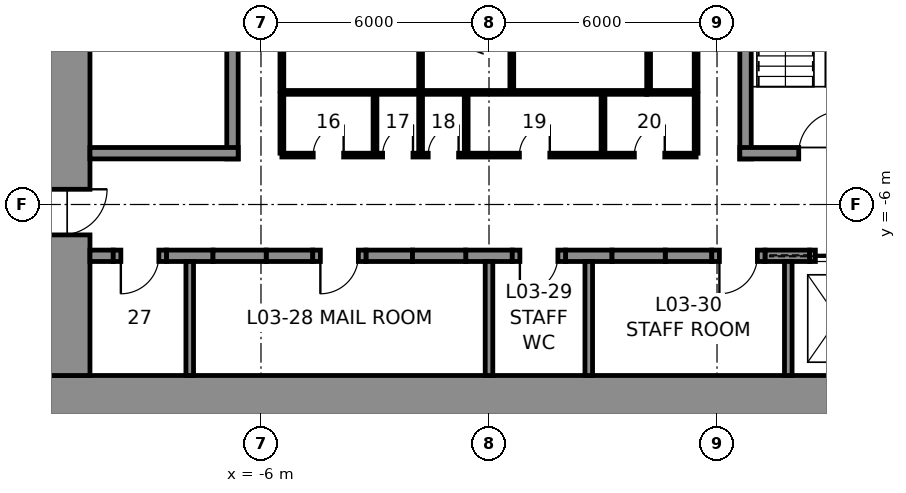
"""IFC4 building model, lengths in metres.
Left out: names, types, materials, properties, quantities, classifications, styles, units other than length and angle.
Written with IfcOpenShell. Run it as: python <this file> out.ifc"""

import sys

from ifc_helpers import new_model, si_unit, direction, frame, frame_2d, origin, place, context, subcontext, project, spatial, rectangle, extrude, element, fill, save


model = new_model("IFC4")
c1 = context("Model", 3, precision=1e-05, world=origin(), true_north=direction((0.0, 1.0)))
c2 = subcontext(c1, "Body", "Model", "MODEL_VIEW")
j1 = project(units=[si_unit("LENGTHUNIT", "METRE"), si_unit("PLANEANGLEUNIT", "RADIAN")], contexts=[c1])
p1 = place(None, origin())
s1 = spatial("IfcSite", under=j1, at=p1, CompositionType="ELEMENT")
p2 = place(p1, origin())
s2 = spatial("IfcBuilding", under=s1, at=p2, CompositionType="ELEMENT")
p3 = place(p2, frame((0.0, 0.0, 16.0)))
s3 = spatial("IfcBuildingStorey", under=s2, at=p3, CompositionType="ELEMENT", Elevation=16.0)
p4 = place(p3, frame((12.0, -11.25, 0.0), z_axis=(0.0, 0.0, 1.0), x_axis=(-1.0, 0.0, 0.0)))
e1 = element("IfcWall", 1, at=p4, inside=s3, PredefinedType="SHEAR", context=c2, shape_type="SweptSolid", body=[
    extrude(rectangle(XDim=24.0, YDim=1.5, at=frame_2d((12.0, 0.0))), origin(), (0.0, 0.0, 1.0), 5.0),
])
p5 = place(p3, frame((-11.25, -10.5, 0.0), z_axis=(0.0, 0.0, 1.0), x_axis=(0.0, 1.0, 0.0)))
e2 = element("IfcWall", 2, at=p5, inside=s3, PredefinedType="SHEAR", context=c2, shape_type="SweptSolid", body=[
    extrude(rectangle(XDim=21.0, YDim=1.5, at=frame_2d((10.5, 0.0))), origin(), (0.0, 0.0, 1.0), 5.0),
])
p6 = place(p5, frame((16.1, 0.0, 0.0)))
e3 = element("IfcOpeningElement", 3, at=p6, cuts=e2, PredefinedType="OPENING", context=c2, shape_type="SweptSolid", body=[
    extrude(rectangle(XDim=1.2, YDim=2.3, at=frame_2d((0.6, 1.15))), frame((0.0, 0.76, 0.0), z_axis=(0.0, -1.0, 0.0), x_axis=(1.0, 0.0, 0.0)), (0.0, 0.0, 1.0), 1.52),
])
p7 = place(p5, frame((3.7, 0.0, 0.0)))
e4 = element("IfcOpeningElement", 4, at=p7, cuts=e2, PredefinedType="OPENING", context=c2, shape_type="SweptSolid", body=[
    extrude(rectangle(XDim=1.2, YDim=2.3, at=frame_2d((0.6, 1.15))), frame((0.0, 0.76, 0.0), z_axis=(0.0, -1.0, 0.0), x_axis=(1.0, 0.0, 0.0)), (0.0, 0.0, 1.0), 1.52),
])
p8 = place(p3, frame((-10.5, -7.35, 0.0), z_axis=(0.0, 0.0, 1.0), x_axis=(1.0, 0.0, 0.0)))
e5 = element("IfcWall", 5, at=p8, inside=s3, PredefinedType="SHEAR", context=c2, shape_type="SweptSolid", body=[
    extrude(rectangle(XDim=0.613, YDim=0.3, at=frame_2d((0.306, 0.0))), origin(), (0.0, 0.0, 1.0), 5.0),
])
for number, where, z_axis, x_axis in (
    (6, (-8.488, -7.35, 0.0), (0.0, 0.0, 1.0), (1.0, 0.0, 0.0)),
    (7, (-5.863, -7.35, 0.0), (0.0, 0.0, 1.0), (1.0, 0.0, 0.0)),
    (8, (-3.238, -7.35, 0.0), (0.0, 0.0, 1.0), (1.0, 0.0, 0.0)),
    (9, (-0.613, -7.35, 0.0), (0.0, 0.0, 1.0), (1.0, 0.0, 0.0)),
    (10, (2.012, -7.35, 0.0), (0.0, 0.0, 1.0), (1.0, 0.0, 0.0)),
    (11, (4.637, -7.35, 0.0), (0.0, 0.0, 1.0), (1.0, 0.0, 0.0)),
):
    element("IfcWall", number, at=place(p3, frame(where, z_axis=z_axis, x_axis=x_axis)), inside=s3, PredefinedType="SHEAR", context=c2, shape_type="SweptSolid", body=[
        extrude(rectangle(XDim=1.225, YDim=0.3, at=frame_2d((0.613, 0.0))), origin(), (0.0, 0.0, 1.0), 5.0),
    ])
p9 = place(p3, frame((7.262, -7.35, 0.0), z_axis=(0.0, 0.0, 1.0), x_axis=(1.0, 0.0, 0.0)))
e12 = element("IfcWall", 12, at=p9, inside=s3, PredefinedType="SHEAR", context=c2, shape_type="SweptSolid", body=[
    extrude(rectangle(XDim=1.175, YDim=0.3, at=frame_2d((0.587, 0.0))), origin(), (0.0, 0.0, 1.0), 5.0),
])
p10 = place(p3, frame((-9.887, -7.35, 0.0), z_axis=(0.0, 0.0, 1.0), x_axis=(1.0, 0.0, 0.0)))
e13 = element("IfcWall", 13, at=p10, inside=s3, PredefinedType="PARTITIONING", context=c2, shape_type="SweptSolid", body=[
    extrude(rectangle(XDim=1.4, YDim=0.3, at=frame_2d((0.7, 0.0))), origin(), (0.0, 0.0, 1.0), 5.0),
])
p11 = place(p10, frame((0.2, 0.0, 0.0)))
e14 = element("IfcOpeningElement", 14, at=p11, cuts=e13, PredefinedType="OPENING", context=c2, shape_type="SweptSolid", body=[
    extrude(rectangle(XDim=1.0, YDim=2.3, at=frame_2d((0.5, 1.15))), frame((0.0, 0.16, 0.0), z_axis=(0.0, -1.0, 0.0), x_axis=(1.0, 0.0, 0.0)), (0.0, 0.0, 1.0), 0.32),
])
p12 = place(p3, frame((-7.262, -7.35, 0.0), z_axis=(0.0, 0.0, 1.0), x_axis=(1.0, 0.0, 0.0)))
e15 = element("IfcWall", 15, at=p12, inside=s3, PredefinedType="PARTITIONING", context=c2, shape_type="SweptSolid", body=[
    extrude(rectangle(XDim=1.4, YDim=0.3, at=frame_2d((0.7, 0.0))), origin(), (0.0, 0.0, 1.0), 5.0),
])
p13 = place(p3, frame((-4.637, -7.35, 0.0), z_axis=(0.0, 0.0, 1.0), x_axis=(1.0, 0.0, 0.0)))
e16 = element("IfcWall", 16, at=p13, inside=s3, PredefinedType="PARTITIONING", context=c2, shape_type="SweptSolid", body=[
    extrude(rectangle(XDim=1.4, YDim=0.3, at=frame_2d((0.7, 0.0))), origin(), (0.0, 0.0, 1.0), 5.0),
])
p14 = place(p13, frame((0.2, 0.0, 0.0)))
e17 = element("IfcOpeningElement", 17, at=p14, cuts=e16, PredefinedType="OPENING", context=c2, shape_type="SweptSolid", body=[
    extrude(rectangle(XDim=1.0, YDim=2.3, at=frame_2d((0.5, 1.15))), frame((0.0, 0.16, 0.0), z_axis=(0.0, -1.0, 0.0), x_axis=(1.0, 0.0, 0.0)), (0.0, 0.0, 1.0), 0.32),
])
p15 = place(p3, frame((-2.012, -7.35, 0.0), z_axis=(0.0, 0.0, 1.0), x_axis=(1.0, 0.0, 0.0)))
e18 = element("IfcWall", 18, at=p15, inside=s3, PredefinedType="PARTITIONING", context=c2, shape_type="SweptSolid", body=[
    extrude(rectangle(XDim=1.4, YDim=0.3, at=frame_2d((0.7, 0.0))), origin(), (0.0, 0.0, 1.0), 5.0),
])
p16 = place(p3, frame((0.613, -7.35, 0.0), z_axis=(0.0, 0.0, 1.0), x_axis=(1.0, 0.0, 0.0)))
e19 = element("IfcWall", 19, at=p16, inside=s3, PredefinedType="PARTITIONING", context=c2, shape_type="SweptSolid", body=[
    extrude(rectangle(XDim=1.4, YDim=0.3, at=frame_2d((0.7, 0.0))), origin(), (0.0, 0.0, 1.0), 5.0),
])
p17 = place(p16, frame((0.2, 0.0, 0.0)))
e20 = element("IfcOpeningElement", 20, at=p17, cuts=e19, PredefinedType="OPENING", context=c2, shape_type="SweptSolid", body=[
    extrude(rectangle(XDim=1.0, YDim=2.3, at=frame_2d((0.5, 1.15))), frame((0.0, 0.16, 0.0), z_axis=(0.0, -1.0, 0.0), x_axis=(1.0, 0.0, 0.0)), (0.0, 0.0, 1.0), 0.32),
])
p18 = place(p3, frame((3.238, -7.35, 0.0), z_axis=(0.0, 0.0, 1.0), x_axis=(1.0, 0.0, 0.0)))
e21 = element("IfcWall", 21, at=p18, inside=s3, PredefinedType="PARTITIONING", context=c2, shape_type="SweptSolid", body=[
    extrude(rectangle(XDim=1.4, YDim=0.3, at=frame_2d((0.7, 0.0))), origin(), (0.0, 0.0, 1.0), 5.0),
])
p19 = place(p3, frame((5.863, -7.35, 0.0), z_axis=(0.0, 0.0, 1.0), x_axis=(1.0, 0.0, 0.0)))
e22 = element("IfcWall", 22, at=p19, inside=s3, PredefinedType="PARTITIONING", context=c2, shape_type="SweptSolid", body=[
    extrude(rectangle(XDim=1.4, YDim=0.3, at=frame_2d((0.7, 0.0))), origin(), (0.0, 0.0, 1.0), 5.0),
])
p20 = place(p19, frame((0.2, 0.0, 0.0)))
e23 = element("IfcOpeningElement", 23, at=p20, cuts=e22, PredefinedType="OPENING", context=c2, shape_type="SweptSolid", body=[
    extrude(rectangle(XDim=1.0, YDim=2.3, at=frame_2d((0.5, 1.15))), frame((0.0, 0.16, 0.0), z_axis=(0.0, -1.0, 0.0), x_axis=(1.0, 0.0, 0.0)), (0.0, 0.0, 1.0), 0.32),
])
p21 = place(p3, frame((8.438, -7.35, 0.0), z_axis=(0.0, 0.0, 1.0), x_axis=(1.0, 0.0, 0.0)))
e24 = element("IfcWall", 24, at=p21, inside=s3, PredefinedType="PARTITIONING", context=c2, shape_type="SweptSolid", body=[
    extrude(rectangle(XDim=1.5, YDim=0.3, at=frame_2d((0.75, 0.0))), origin(), (0.0, 0.0, 1.0), 5.0),
])
p22 = place(p21, frame((0.15, 0.0, 0.0)))
e25 = element("IfcOpeningElement", 25, at=p22, cuts=e24, PredefinedType="OPENING", context=c2, shape_type="SweptSolid", body=[
    extrude(rectangle(XDim=1.2, YDim=2.3, at=frame_2d((0.6, 1.15))), frame((0.0, 0.16, 0.0), z_axis=(0.0, -1.0, 0.0), x_axis=(1.0, 0.0, 0.0)), (0.0, 0.0, 1.0), 0.32),
])
for number, where, z_axis, x_axis in (
    (26, (-7.875, -10.5, 0.0), (0.0, 0.0, 1.0), (0.0, 1.0, 0.0)),
    (27, (0.0, -10.5, 0.0), (0.0, 0.0, 1.0), (0.0, 1.0, 0.0)),
    (28, (2.625, -10.5, 0.0), (0.0, 0.0, 1.0), (0.0, 1.0, 0.0)),
    (29, (7.875, -10.5, 0.0), (0.0, 0.0, 1.0), (0.0, 1.0, 0.0)),
):
    element("IfcWall", number, at=place(p3, frame(where, z_axis=z_axis, x_axis=x_axis)), inside=s3, PredefinedType="PARTITIONING", context=c2, shape_type="SweptSolid", body=[
        extrude(rectangle(XDim=3.0, YDim=0.2, at=frame_2d((1.5, 0.0))), origin(), (0.0, 0.0, 1.0), 5.0),
    ])
p23 = place(p3, frame((-6.75, -4.8, 0.0), z_axis=(0.0, 0.0, 1.0), x_axis=(0.0, 1.0, 0.0)))
e30 = element("IfcWall", 30, at=p23, inside=s3, PredefinedType="SOLIDWALL", context=c2, shape_type="SweptSolid", body=[
    extrude(rectangle(XDim=9.6, YDim=0.3, at=frame_2d((4.8, 0.0))), origin(), (0.0, 0.0, 1.0), 4.75),
])
p24 = place(p3, frame((-6.6, -4.65, 0.0), z_axis=(0.0, 0.0, 1.0), x_axis=(-1.0, 0.0, 0.0)))
e31 = element("IfcWall", 31, at=p24, inside=s3, PredefinedType="SOLIDWALL", context=c2, shape_type="SweptSolid", body=[
    extrude(rectangle(XDim=3.9, YDim=0.3, at=frame_2d((1.95, 0.0))), origin(), (0.0, 0.0, 1.0), 4.75),
])
p25 = place(p3, frame((6.75, -4.8, 0.0), z_axis=(0.0, 0.0, 1.0), x_axis=(0.0, 1.0, 0.0)))
e32 = element("IfcWall", 32, at=p25, inside=s3, PredefinedType="SOLIDWALL", context=c2, shape_type="SweptSolid", body=[
    extrude(rectangle(XDim=9.6, YDim=0.3, at=frame_2d((4.8, 0.0))), origin(), (0.0, 0.0, 1.0), 4.75),
])
p26 = place(p3, frame((10.5, -4.65, 0.0), z_axis=(0.0, 0.0, 1.0), x_axis=(-1.0, 0.0, 0.0)))
e33 = element("IfcWall", 33, at=p26, inside=s3, PredefinedType="SOLIDWALL", context=c2, shape_type="SweptSolid", body=[
    extrude(rectangle(XDim=3.9, YDim=0.3, at=frame_2d((1.95, 0.0))), origin(), (0.0, 0.0, 1.0), 4.75),
])
p27 = place(p26, frame((1.25, 0.0, 0.0)))
e34 = element("IfcOpeningElement", 34, at=p27, cuts=e33, PredefinedType="OPENING", context=c2, shape_type="SweptSolid", body=[
    extrude(rectangle(XDim=1.1, YDim=2.3, at=frame_2d((0.55, 1.15))), frame((0.0, 0.16, 0.0), z_axis=(0.0, -1.0, 0.0), x_axis=(1.0, 0.0, 0.0)), (0.0, 0.0, 1.0), 0.32),
])
p28 = place(p3, frame((4.15, -3.05, 0.0), z_axis=(0.0, 0.0, 1.0), x_axis=(-1.0, 0.0, 0.0)))
e35 = element("IfcWall", 35, at=p28, inside=s3, PredefinedType="PARTITIONING", context=c2, shape_type="SweptSolid", body=[
    extrude(rectangle(XDim=9.6, YDim=0.1, at=frame_2d((4.8, 0.0))), origin(), (0.0, 0.0, 1.0), 4.75),
])
p29 = place(p3, frame((5.45, -3.05, 0.0), z_axis=(0.0, 0.0, 1.0), x_axis=(-1.0, 0.0, 0.0)))
e36 = element("IfcWall", 36, at=p29, inside=s3, PredefinedType="PARTITIONING", context=c2, shape_type="SweptSolid", body=[
    extrude(rectangle(XDim=1.3, YDim=0.1, at=frame_2d((0.65, 0.0))), origin(), (0.0, 0.0, 1.0), 4.75),
])
for number, where, z_axis, x_axis in (
    (37, (5.45, 3.0, 0.0), (0.0, 0.0, 1.0), (0.0, -1.0, 0.0)),
    (38, (-5.45, -3.0, 0.0), (0.0, 0.0, 1.0), (0.0, 1.0, 0.0)),
    (39, (-1.8, -3.0, 0.0), (0.0, 0.0, 1.0), (0.0, 1.0, 0.0)),
    (40, (0.6, -3.0, 0.0), (0.0, 0.0, 1.0), (0.0, 1.0, 0.0)),
    (41, (4.2, -3.0, 0.0), (0.0, 0.0, 1.0), (0.0, 1.0, 0.0)),
):
    element("IfcWall", number, at=place(p3, frame(where, z_axis=z_axis, x_axis=x_axis)), inside=s3, PredefinedType="PARTITIONING", context=c2, shape_type="SweptSolid", body=[
        extrude(rectangle(XDim=6.0, YDim=0.1, at=frame_2d((3.0, 0.0))), origin(), (0.0, 0.0, 1.0), 4.75),
    ])
p30 = place(p3, frame((5.45, -4.7, 0.0), z_axis=(0.0, 0.0, 1.0), x_axis=(-1.0, 0.0, 0.0)))
e42 = element("IfcWall", 42, at=p30, inside=s3, PredefinedType="PARTITIONING", context=c2, shape_type="SweptSolid", body=[
    extrude(rectangle(XDim=10.9, YDim=0.1, at=frame_2d((5.45, 0.0))), origin(), (0.0, 0.0, 1.0), 4.75),
])
p31 = place(p30, frame((9.275, 0.0, 0.0)))
e43 = element("IfcOpeningElement", 43, at=p31, cuts=e42, PredefinedType="OPENING", context=c2, shape_type="SweptSolid", body=[
    extrude(rectangle(XDim=0.8, YDim=2.3, at=frame_2d((0.4, 1.15))), frame((0.0, 0.06, 0.0), z_axis=(0.0, -1.0, 0.0), x_axis=(1.0, 0.0, 0.0)), (0.0, 0.0, 1.0), 0.12),
])
p32 = place(p30, frame((7.45, 0.0, 0.0)))
e44 = element("IfcOpeningElement", 44, at=p32, cuts=e42, PredefinedType="OPENING", context=c2, shape_type="SweptSolid", body=[
    extrude(rectangle(XDim=0.8, YDim=2.3, at=frame_2d((0.4, 1.15))), frame((0.0, 0.06, 0.0), z_axis=(0.0, -1.0, 0.0), x_axis=(1.0, 0.0, 0.0)), (0.0, 0.0, 1.0), 0.12),
])
p33 = place(p30, frame((6.25, 0.0, 0.0)))
e45 = element("IfcOpeningElement", 45, at=p33, cuts=e42, PredefinedType="OPENING", context=c2, shape_type="SweptSolid", body=[
    extrude(rectangle(XDim=0.8, YDim=2.3, at=frame_2d((0.4, 1.15))), frame((0.0, 0.06, 0.0), z_axis=(0.0, -1.0, 0.0), x_axis=(1.0, 0.0, 0.0)), (0.0, 0.0, 1.0), 0.12),
])
p34 = place(p30, frame((3.85, 0.0, 0.0)))
e46 = element("IfcOpeningElement", 46, at=p34, cuts=e42, PredefinedType="OPENING", context=c2, shape_type="SweptSolid", body=[
    extrude(rectangle(XDim=0.8, YDim=2.3, at=frame_2d((0.4, 1.15))), frame((0.0, 0.06, 0.0), z_axis=(0.0, -1.0, 0.0), x_axis=(1.0, 0.0, 0.0)), (0.0, 0.0, 1.0), 0.12),
])
p35 = place(p30, frame((0.825, 0.0, 0.0)))
e47 = element("IfcOpeningElement", 47, at=p35, cuts=e42, PredefinedType="OPENING", context=c2, shape_type="SweptSolid", body=[
    extrude(rectangle(XDim=0.8, YDim=2.3, at=frame_2d((0.4, 1.15))), frame((0.0, 0.06, 0.0), z_axis=(0.0, -1.0, 0.0), x_axis=(1.0, 0.0, 0.0)), (0.0, 0.0, 1.0), 0.12),
])
for number, where, z_axis, x_axis in (
    (48, (-5.45, -3.1, 0.0), (0.0, 0.0, 1.0), (0.0, -1.0, 0.0)),
    (49, (5.45, -3.1, 0.0), (0.0, 0.0, 1.0), (0.0, -1.0, 0.0)),
    (50, (-3.0, -3.1, 0.0), (0.0, 0.0, 1.0), (0.0, -1.0, 0.0)),
    (51, (-1.8, -3.1, 0.0), (0.0, 0.0, 1.0), (0.0, -1.0, 0.0)),
    (52, (-0.6, -3.1, 0.0), (0.0, 0.0, 1.0), (0.0, -1.0, 0.0)),
    (53, (3.0, -3.1, 0.0), (0.0, 0.0, 1.0), (0.0, -1.0, 0.0)),
):
    element("IfcWall", number, at=place(p3, frame(where, z_axis=z_axis, x_axis=x_axis)), inside=s3, PredefinedType="PARTITIONING", context=c2, shape_type="SweptSolid", body=[
        extrude(rectangle(XDim=1.55, YDim=0.1, at=frame_2d((0.775, 0.0))), origin(), (0.0, 0.0, 1.0), 4.75),
    ])
p36 = place(p27, frame((1.1, 0.0, 0.0), z_axis=(0.0, 0.0, 1.0), x_axis=(-1.0, 0.0, 0.0)))
e54 = element("IfcDoor", 54, at=p36, inside=s3, OperationType="SINGLE_SWING_RIGHT", PredefinedType="DOOR", context=c2, shape_type="SweptSolid", body=[
    extrude(rectangle(XDim=1.1, YDim=2.3, at=frame_2d((0.55, 1.15))), frame((0.0, 0.025, 0.0), z_axis=(0.0, -1.0, 0.0), x_axis=(1.0, 0.0, 0.0)), (0.0, 0.0, 1.0), 0.05),
])
fill(e34, e54)
p37 = place(p31, frame((0.8, 0.0, 0.0), z_axis=(0.0, 0.0, 1.0), x_axis=(-1.0, 0.0, 0.0)))
e55 = element("IfcDoor", 55, at=p37, inside=s3, OperationType="SINGLE_SWING_RIGHT", PredefinedType="DOOR", context=c2, shape_type="SweptSolid", body=[
    extrude(rectangle(XDim=0.8, YDim=2.3, at=frame_2d((0.4, 1.15))), frame((0.0, 0.025, 0.0), z_axis=(0.0, -1.0, 0.0), x_axis=(1.0, 0.0, 0.0)), (0.0, 0.0, 1.0), 0.05),
])
fill(e43, e55)
p38 = place(p32, frame((0.8, 0.0, 0.0), z_axis=(0.0, 0.0, 1.0), x_axis=(-1.0, 0.0, 0.0)))
e56 = element("IfcDoor", 56, at=p38, inside=s3, OperationType="SINGLE_SWING_RIGHT", PredefinedType="DOOR", context=c2, shape_type="SweptSolid", body=[
    extrude(rectangle(XDim=0.8, YDim=2.3, at=frame_2d((0.4, 1.15))), frame((0.0, 0.025, 0.0), z_axis=(0.0, -1.0, 0.0), x_axis=(1.0, 0.0, 0.0)), (0.0, 0.0, 1.0), 0.05),
])
fill(e44, e56)
p39 = place(p33, frame((0.8, 0.0, 0.0), z_axis=(0.0, 0.0, 1.0), x_axis=(-1.0, 0.0, 0.0)))
e57 = element("IfcDoor", 57, at=p39, inside=s3, OperationType="SINGLE_SWING_RIGHT", PredefinedType="DOOR", context=c2, shape_type="SweptSolid", body=[
    extrude(rectangle(XDim=0.8, YDim=2.3, at=frame_2d((0.4, 1.15))), frame((0.0, 0.025, 0.0), z_axis=(0.0, -1.0, 0.0), x_axis=(1.0, 0.0, 0.0)), (0.0, 0.0, 1.0), 0.05),
])
fill(e45, e57)
p40 = place(p34, frame((0.8, 0.0, 0.0), z_axis=(0.0, 0.0, 1.0), x_axis=(-1.0, 0.0, 0.0)))
e58 = element("IfcDoor", 58, at=p40, inside=s3, OperationType="SINGLE_SWING_RIGHT", PredefinedType="DOOR", context=c2, shape_type="SweptSolid", body=[
    extrude(rectangle(XDim=0.8, YDim=2.3, at=frame_2d((0.4, 1.15))), frame((0.0, 0.025, 0.0), z_axis=(0.0, -1.0, 0.0), x_axis=(1.0, 0.0, 0.0)), (0.0, 0.0, 1.0), 0.05),
])
fill(e46, e58)
p41 = place(p35, frame((0.8, 0.0, 0.0), z_axis=(0.0, 0.0, 1.0), x_axis=(-1.0, 0.0, 0.0)))
e59 = element("IfcDoor", 59, at=p41, inside=s3, OperationType="SINGLE_SWING_RIGHT", PredefinedType="DOOR", context=c2, shape_type="SweptSolid", body=[
    extrude(rectangle(XDim=0.8, YDim=2.3, at=frame_2d((0.4, 1.15))), frame((0.0, 0.025, 0.0), z_axis=(0.0, -1.0, 0.0), x_axis=(1.0, 0.0, 0.0)), (0.0, 0.0, 1.0), 0.05),
])
fill(e47, e59)
p42 = place(p11, frame((1.0, 0.0, 0.0), z_axis=(0.0, 0.0, 1.0), x_axis=(-1.0, 0.0, 0.0)))
e60 = element("IfcDoor", 60, at=p42, inside=s3, OperationType="SINGLE_SWING_RIGHT", PredefinedType="DOOR", context=c2, shape_type="SweptSolid", body=[
    extrude(rectangle(XDim=1.0, YDim=2.3, at=frame_2d((0.5, 1.15))), frame((0.0, 0.025, 0.0), z_axis=(0.0, -1.0, 0.0), x_axis=(1.0, 0.0, 0.0)), (0.0, 0.0, 1.0), 0.05),
])
fill(e14, e60)
p43 = place(p14, frame((1.0, 0.0, 0.0), z_axis=(0.0, 0.0, 1.0), x_axis=(-1.0, 0.0, 0.0)))
e61 = element("IfcDoor", 61, at=p43, inside=s3, OperationType="SINGLE_SWING_RIGHT", PredefinedType="DOOR", context=c2, shape_type="SweptSolid", body=[
    extrude(rectangle(XDim=1.0, YDim=2.3, at=frame_2d((0.5, 1.15))), frame((0.0, 0.025, 0.0), z_axis=(0.0, -1.0, 0.0), x_axis=(1.0, 0.0, 0.0)), (0.0, 0.0, 1.0), 0.05),
])
fill(e17, e61)
p44 = place(p17, frame((1.0, 0.0, 0.0), z_axis=(0.0, 0.0, 1.0), x_axis=(-1.0, 0.0, 0.0)))
e62 = element("IfcDoor", 62, at=p44, inside=s3, OperationType="SINGLE_SWING_RIGHT", PredefinedType="DOOR", context=c2, shape_type="SweptSolid", body=[
    extrude(rectangle(XDim=1.0, YDim=2.3, at=frame_2d((0.5, 1.15))), frame((0.0, 0.025, 0.0), z_axis=(0.0, -1.0, 0.0), x_axis=(1.0, 0.0, 0.0)), (0.0, 0.0, 1.0), 0.05),
])
fill(e20, e62)
p45 = place(p20, frame((1.0, 0.0, 0.0), z_axis=(0.0, 0.0, 1.0), x_axis=(-1.0, 0.0, 0.0)))
e63 = element("IfcDoor", 63, at=p45, inside=s3, OperationType="SINGLE_SWING_RIGHT", PredefinedType="DOOR", context=c2, shape_type="SweptSolid", body=[
    extrude(rectangle(XDim=1.0, YDim=2.3, at=frame_2d((0.5, 1.15))), frame((0.0, 0.025, 0.0), z_axis=(0.0, -1.0, 0.0), x_axis=(1.0, 0.0, 0.0)), (0.0, 0.0, 1.0), 0.05),
])
fill(e23, e63)
p46 = place(p7, frame((1.2, 0.0, 0.0), z_axis=(0.0, 0.0, 1.0), x_axis=(-1.0, 0.0, 0.0)))
e64 = element("IfcDoor", 64, at=p46, inside=s3, OperationType="SINGLE_SWING_LEFT", PredefinedType="DOOR", context=c2, shape_type="SweptSolid", body=[
    extrude(rectangle(XDim=1.2, YDim=2.3, at=frame_2d((0.6, 1.15))), frame((0.0, 0.025, 0.0), z_axis=(0.0, -1.0, 0.0), x_axis=(1.0, 0.0, 0.0)), (0.0, 0.0, 1.0), 0.05),
])
fill(e4, e64)
p47 = place(p22, origin())
e65 = element("IfcDoor", 65, at=p47, inside=s3, OperationType="SLIDING_TO_LEFT", PredefinedType="DOOR", context=c2, shape_type="SweptSolid", body=[
    extrude(rectangle(XDim=1.2, YDim=2.3, at=frame_2d((0.6, 1.15))), frame((0.0, 0.025, 0.0), z_axis=(0.0, -1.0, 0.0), x_axis=(1.0, 0.0, 0.0)), (0.0, 0.0, 1.0), 0.05),
])
fill(e25, e65)
save(model, sys.argv[1])
